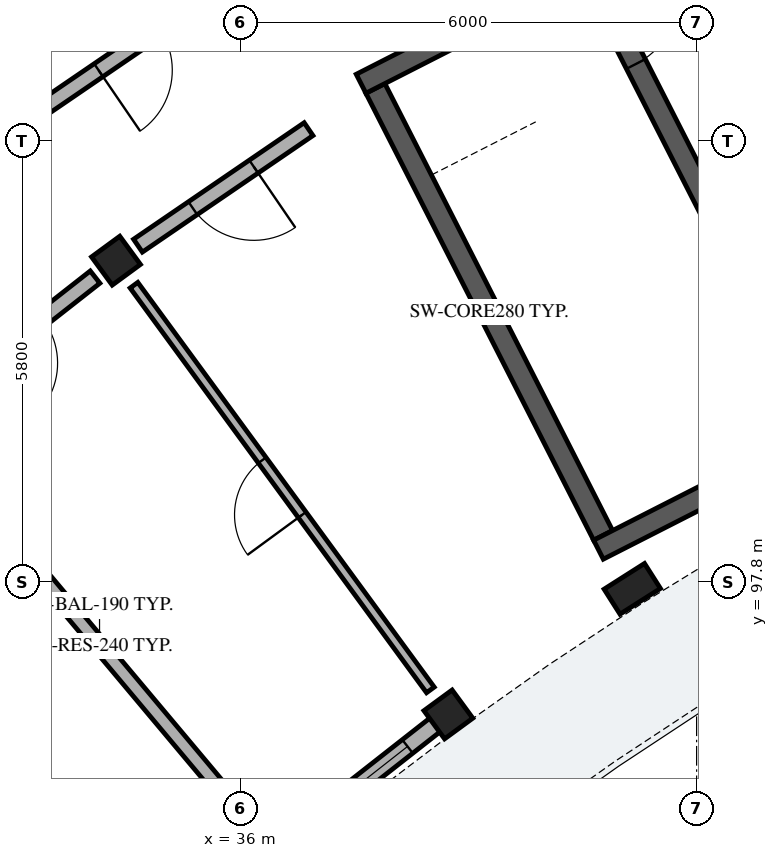
"""IFC4 building model, lengths in metres.
Left out: names, types, materials, properties, quantities, classifications, styles, units other than length and angle.
Written with IfcOpenShell. Run it as: python <this file> out.ifc"""

import sys

from ifc_helpers import new_model, si_unit, direction, frame, frame_2d, origin, origin_2d, place, context, subcontext, project, spatial, rectangle, extrude, element, fill, save


model = new_model("IFC4")
c1 = context("Model", 3, precision=1e-05, world=origin(), true_north=direction((0.0, 1.0)))
c2 = subcontext(c1, "Body", "Model", "MODEL_VIEW")
j1 = project(units=[si_unit("LENGTHUNIT", "METRE"), si_unit("PLANEANGLEUNIT", "RADIAN")], contexts=[c1])
p1 = place(None, origin())
s1 = spatial("IfcSite", under=j1, at=p1, CompositionType="ELEMENT")
p2 = place(p1, origin())
s2 = spatial("IfcBuilding", under=s1, at=p2, CompositionType="ELEMENT")
p3 = place(p2, frame((0.0, 0.0, 49.16)))
s3 = spatial("IfcBuildingStorey", under=s2, at=p3, CompositionType="ELEMENT", Elevation=49.16)
p4 = place(p3, frame((37.773, 104.296, 0.0), z_axis=(0.0, 0.0, 1.0), x_axis=(0.453992276384, -0.891005618941, 0.0)))
e1 = element("IfcWall", 1, at=p4, inside=s3, PredefinedType="SHEAR", context=c2, shape_type="SweptSolid", body=[
    extrude(rectangle(XDim=6.6, YDim=0.28, at=frame_2d((3.3, 0.0))), origin(), (0.0, 0.0, 1.0), 3.11),
])
for number, where, z_axis, x_axis in (
    (2, (40.709, 98.227, 0.0), (0.0, 0.0, 1.0), (0.891, 0.454, 0.0)),
    (3, (37.585, 104.357, 0.0), (0.0, 0.0, 1.0), (0.891, 0.454, 0.0)),
):
    element("IfcWall", number, at=place(p3, frame(where, z_axis=z_axis, x_axis=x_axis)), inside=s3, PredefinedType="SHEAR", context=c2, shape_type="SweptSolid", body=[
        extrude(rectangle(XDim=3.48, YDim=0.28, at=frame_2d((1.74, 0.0))), origin(), (0.0, 0.0, 1.0), 3.11),
    ])
p5 = place(p3, frame((40.625, 105.748, 0.0), z_axis=(0.0, 0.0, 1.0), x_axis=(0.453992276384, -0.891005618941, 0.0)))
e4 = element("IfcWall", 4, at=p5, inside=s3, PredefinedType="SHEAR", context=c2, shape_type="SweptSolid", body=[
    extrude(rectangle(XDim=6.6, YDim=0.28, at=frame_2d((3.3, 0.0))), origin(), (0.0, 0.0, 1.0), 3.11),
])
p6 = place(p5, frame((0.22, 0.0, 0.0)))
e5 = element("IfcOpeningElement", 5, at=p6, cuts=e4, PredefinedType="OPENING", context=c2, shape_type="SweptSolid", body=[
    extrude(rectangle(XDim=1.05, YDim=2.15, at=frame_2d((0.525, 1.075))), frame((0.0, 0.15, 0.0), z_axis=(0.0, -1.0, 0.0), x_axis=(1.0, 0.0, 0.0)), (0.0, 0.0, 1.0), 0.3),
])
p7 = place(p3, frame((41.153, 97.712, 0.0), z_axis=(0.0, 0.0, 1.0), x_axis=(-0.536481603385, 0.843912015099, 0.0)))
e6 = element("IfcColumn", 6, at=p7, inside=s3, PredefinedType="PILASTER", context=c2, shape_type="SweptSolid", body=[
    extrude(rectangle(XDim=0.39, YDim=0.63, at=origin_2d()), origin(), (0.0, 0.0, 1.0), 3.1),
])
for number, where, z_axis, x_axis in (
    (7, (38.734, 96.059, 0.0), (0.0, 0.0, 1.0), (-0.591, 0.807, 0.0)),
    (8, (34.361, 102.029, 0.0), (0.0, 0.0, 1.0), (-0.591, 0.807, 0.0)),
):
    element("IfcColumn", number, at=place(p3, frame(where, z_axis=z_axis, x_axis=x_axis)), inside=s3, PredefinedType="COLUMN", context=c2, shape_type="SweptSolid", body=[
        extrude(rectangle(XDim=0.46, YDim=0.46, at=origin_2d()), origin(), (0.0, 0.0, 1.0), 3.1),
    ])
p8 = place(p3, frame((38.576, 95.936, 0.0), z_axis=(0.0, 0.0, 1.0), x_axis=(-0.786839825132, -0.617157264874, 0.0)))
e9 = element("IfcWall", 9, at=p8, inside=s3, PredefinedType="SOLIDWALL", context=c2, shape_type="SweptSolid", body=[
    extrude(rectangle(XDim=2.565, YDim=0.225, at=frame_2d((1.283, 0.0))), origin(), (0.0, 0.0, 1.0), 2.355),
])
p9 = place(p8, frame((0.483, 0.0, 0.35)))
e10 = element("IfcOpeningElement", 10, at=p9, cuts=e9, PredefinedType="OPENING", context=c2, shape_type="SweptSolid", body=[
    extrude(rectangle(XDim=1.6, YDim=1.75, at=frame_2d((0.8, 0.875))), frame((0.0, 0.123, 0.0), z_axis=(0.0, -1.0, 0.0), x_axis=(1.0, 0.0, 0.0)), (0.0, 0.0, 1.0), 0.245),
])
p10 = place(p3, frame((35.714, 105.616, 0.0), z_axis=(0.0, 0.0, 1.0), x_axis=(-0.825779671787, -0.563992848947, 0.0)))
e11 = element("IfcWall", 11, at=p10, inside=s3, PredefinedType="PARTITIONING", context=c2, shape_type="SweptSolid", body=[
    extrude(rectangle(XDim=2.863, YDim=0.205, at=frame_2d((1.432, 0.0))), origin(), (0.0, 0.0, 1.0), 2.37),
])
p11 = place(p10, frame((0.947, 0.0, 0.0)))
e12 = element("IfcOpeningElement", 12, at=p11, cuts=e11, PredefinedType="OPENING", context=c2, shape_type="SweptSolid", body=[
    extrude(rectangle(XDim=0.97, YDim=2.15, at=frame_2d((0.485, 1.075))), frame((0.0, 0.113, 0.0), z_axis=(0.0, -1.0, 0.0), x_axis=(1.0, 0.0, 0.0)), (0.0, 0.0, 1.0), 0.225),
])
p12 = place(p3, frame((36.895, 103.76, 0.0), z_axis=(0.0, 0.0, 1.0), x_axis=(-0.825752009056, -0.56403334967, 0.0)))
e13 = element("IfcWall", 13, at=p12, inside=s3, PredefinedType="PARTITIONING", context=c2, shape_type="SweptSolid", body=[
    extrude(rectangle(XDim=2.718, YDim=0.205, at=frame_2d((1.359, 0.0))), origin(), (0.0, 0.0, 1.0), 2.37),
])
p13 = place(p12, frame((0.874, 0.0, 0.0)))
e14 = element("IfcOpeningElement", 14, at=p13, cuts=e13, PredefinedType="OPENING", context=c2, shape_type="SweptSolid", body=[
    extrude(rectangle(XDim=0.97, YDim=2.15, at=frame_2d((0.485, 1.075))), frame((0.0, 0.113, 0.0), z_axis=(0.0, -1.0, 0.0), x_axis=(1.0, 0.0, 0.0)), (0.0, 0.0, 1.0), 0.225),
])
p14 = place(p3, frame((38.497, 96.382, 0.0), z_axis=(0.0, 0.0, 1.0), x_axis=(-0.590924179316, 0.806727100263, 0.0)))
e15 = element("IfcWall", 15, at=p14, inside=s3, PredefinedType="PARTITIONING", context=c2, shape_type="SweptSolid", body=[
    extrude(rectangle(XDim=6.6, YDim=0.125, at=frame_2d((3.3, 0.0))), origin(), (0.0, 0.0, 1.0), 2.37),
])
p15 = place(p14, frame((2.855, 0.0, 0.0)))
e16 = element("IfcOpeningElement", 16, at=p15, cuts=e15, PredefinedType="OPENING", context=c2, shape_type="SweptSolid", body=[
    extrude(rectangle(XDim=0.89, YDim=2.1, at=frame_2d((0.445, 1.05))), frame((0.0, 0.073, 0.0), z_axis=(0.0, -1.0, 0.0), x_axis=(1.0, 0.0, 0.0)), (0.0, 0.0, 1.0), 0.145),
])
p16 = place(p3, frame((34.085, 101.813, 0.0), z_axis=(0.0, 0.0, 1.0), x_axis=(-0.786835457019, -0.617162833924, 0.0)))
e17 = element("IfcWall", 17, at=p16, inside=s3, PredefinedType="PARTITIONING", context=c2, shape_type="SweptSolid", body=[
    extrude(rectangle(XDim=2.718, YDim=0.205, at=frame_2d((1.359, 0.0))), origin(), (0.0, 0.0, 1.0), 2.37),
])
p17 = place(p16, frame((0.884, 0.0, 0.0)))
e18 = element("IfcOpeningElement", 18, at=p17, cuts=e17, PredefinedType="OPENING", context=c2, shape_type="SweptSolid", body=[
    extrude(rectangle(XDim=0.95, YDim=2.13, at=frame_2d((0.475, 1.065))), frame((0.0, 0.113, 0.0), z_axis=(0.0, -1.0, 0.0), x_axis=(1.0, 0.0, 0.0)), (0.0, 0.0, 1.0), 0.225),
])
p18 = place(p3, frame((36.171, 94.557, 0.0), z_axis=(0.0, 0.0, 1.0), x_axis=(-0.642789470807, 0.766042881449, 0.0)))
e19 = element("IfcWall", 19, at=p18, inside=s3, PredefinedType="PARTITIONING", context=c2, shape_type="SweptSolid", body=[
    extrude(rectangle(XDim=6.6, YDim=0.185, at=frame_2d((3.3, 0.0))), origin(), (0.0, 0.0, 1.0), 2.37),
])
p19 = place(p9, origin())
e20 = element("IfcWindow", 20, at=p19, inside=s3, PartitioningType="SINGLE_PANEL", PredefinedType="WINDOW", context=c2, shape_type="SweptSolid", body=[
    extrude(rectangle(XDim=1.6, YDim=1.75, at=frame_2d((0.8, 0.875))), frame((0.0, 0.03, 0.0), z_axis=(0.0, -1.0, 0.0), x_axis=(1.0, 0.0, 0.0)), (0.0, 0.0, 1.0), 0.06),
])
fill(e10, e20)
p20 = place(p6, origin())
e21 = element("IfcDoor", 21, at=p20, inside=s3, OperationType="SINGLE_SWING_LEFT", PredefinedType="DOOR", context=c2, shape_type="SweptSolid", body=[
    extrude(rectangle(XDim=1.05, YDim=2.15, at=frame_2d((0.525, 1.075))), frame((0.0, 0.025, 0.0), z_axis=(0.0, -1.0, 0.0), x_axis=(1.0, 0.0, 0.0)), (0.0, 0.0, 1.0), 0.05),
])
fill(e5, e21)
p21 = place(p11, origin())
e22 = element("IfcDoor", 22, at=p21, inside=s3, OperationType="SINGLE_SWING_RIGHT", PredefinedType="DOOR", context=c2, shape_type="SweptSolid", body=[
    extrude(rectangle(XDim=0.97, YDim=2.15, at=frame_2d((0.485, 1.075))), frame((0.0, 0.025, 0.0), z_axis=(0.0, -1.0, 0.0), x_axis=(1.0, 0.0, 0.0)), (0.0, 0.0, 1.0), 0.05),
])
fill(e12, e22)
p22 = place(p13, origin())
e23 = element("IfcDoor", 23, at=p22, inside=s3, OperationType="SINGLE_SWING_LEFT", PredefinedType="DOOR", context=c2, shape_type="SweptSolid", body=[
    extrude(rectangle(XDim=0.97, YDim=2.15, at=frame_2d((0.485, 1.075))), frame((0.0, 0.025, 0.0), z_axis=(0.0, -1.0, 0.0), x_axis=(1.0, 0.0, 0.0)), (0.0, 0.0, 1.0), 0.05),
])
fill(e14, e23)
p23 = place(p15, origin())
e24 = element("IfcDoor", 24, at=p23, inside=s3, OperationType="SINGLE_SWING_LEFT", PredefinedType="DOOR", context=c2, shape_type="SweptSolid", body=[
    extrude(rectangle(XDim=0.89, YDim=2.1, at=frame_2d((0.445, 1.05))), frame((0.0, 0.025, 0.0), z_axis=(0.0, -1.0, 0.0), x_axis=(1.0, 0.0, 0.0)), (0.0, 0.0, 1.0), 0.05),
])
fill(e16, e24)
save(model, sys.argv[1])
